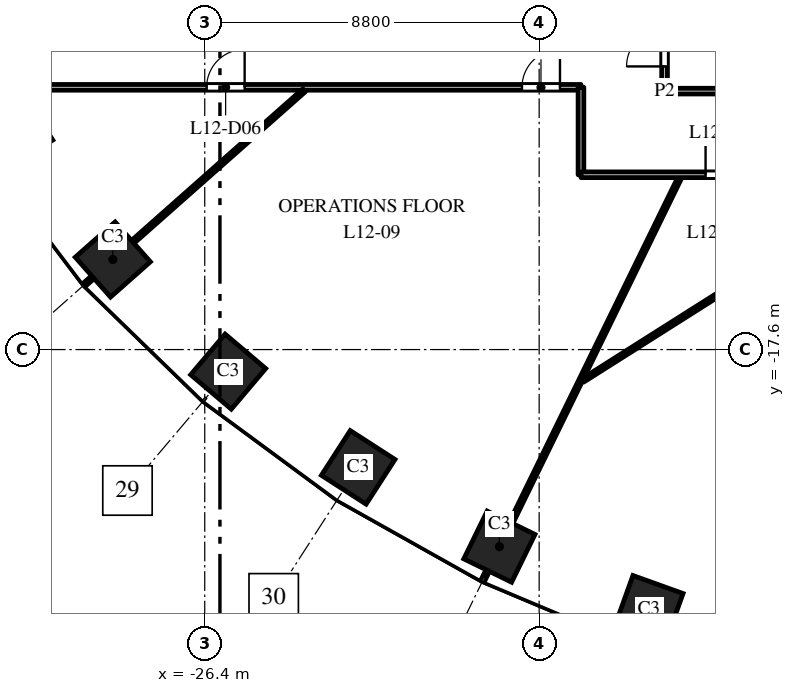
"""IFC4 building model, lengths in metres.
Left out: names, types, materials, properties, quantities, classifications, styles, units other than length and angle.
Written with IfcOpenShell. Run it as: python <this file> out.ifc"""

import sys

from ifc_helpers import new_model, si_unit, direction, frame, frame_2d, origin, origin_2d, place, context, subcontext, project, spatial, rectangle, extrude, element, fill, save


model = new_model("IFC4")
c1 = context("Model", 3, precision=1e-05, world=origin(), true_north=direction((0.0, 1.0)))
c2 = subcontext(c1, "Body", "Model", "MODEL_VIEW")
j1 = project(units=[si_unit("LENGTHUNIT", "METRE"), si_unit("PLANEANGLEUNIT", "RADIAN")], contexts=[c1])
p1 = place(None, origin())
s1 = spatial("IfcSite", under=j1, at=p1, CompositionType="ELEMENT")
p2 = place(p1, origin())
s2 = spatial("IfcBuilding", under=s1, at=p2, CompositionType="ELEMENT")
p3 = place(p2, frame((0.0, 0.0, 58.5)))
s3 = spatial("IfcBuildingStorey", under=s2, at=p3, CompositionType="ELEMENT", Elevation=58.5)
for number, where, z_axis, x_axis in (
    (1, (-31.365, -11.871, 0.0), (0.0, 0.0, 1.0), (0.535, -0.845, 0.0)),
    (2, (-28.819, -15.23, 0.0), (0.0, 0.0, 1.0), (0.663, -0.749, 0.0)),
    (3, (-25.783, -18.18, 0.0), (0.0, 0.0, 1.0), (0.763, -0.646, 0.0)),
    (4, (-22.362, -20.7, 0.0), (0.0, 0.0, 1.0), (0.84, -0.542, 0.0)),
    (5, (-18.646, -22.785, 0.0), (0.0, 0.0, 1.0), (0.898, -0.439, 0.0)),
    (6, (-14.709, -24.441, 0.0), (0.0, 0.0, 1.0), (0.941, -0.338, 0.0)),
):
    element("IfcColumn", number, at=place(p3, frame(where, z_axis=z_axis, x_axis=x_axis)), inside=s3, PredefinedType="COLUMN", context=c2, shape_type="SweptSolid", body=[
        extrude(rectangle(XDim=1.4, YDim=1.4, at=origin_2d()), origin(), (0.0, 0.0, 1.0), 4.0),
    ])
p4 = place(p3, frame((-31.5, -10.7, 0.0), z_axis=(0.0, 0.0, 1.0), x_axis=(1.0, 0.0, 0.0)))
e7 = element("IfcWall", 7, at=p4, inside=s3, PredefinedType="PARTITIONING", context=c2, shape_type="SweptSolid", body=[
    extrude(rectangle(XDim=15.0, YDim=0.15, at=frame_2d((7.5, 0.0))), origin(), (0.0, 0.0, 1.0), 3.1),
])
p5 = place(p4, frame((5.15, 0.0, 0.0)))
e8 = element("IfcOpeningElement", 8, at=p5, cuts=e7, PredefinedType="OPENING", context=c2, shape_type="SweptSolid", body=[
    extrude(rectangle(XDim=1.0, YDim=2.1, at=frame_2d((0.5, 1.05))), frame((0.0, 0.085, 0.0), z_axis=(0.0, -1.0, 0.0), x_axis=(1.0, 0.0, 0.0)), (0.0, 0.0, 1.0), 0.17),
])
p6 = place(p4, frame((13.448, 0.0, 0.0)))
e9 = element("IfcOpeningElement", 9, at=p6, cuts=e7, PredefinedType="OPENING", context=c2, shape_type="SweptSolid", body=[
    extrude(rectangle(XDim=1.0, YDim=2.1, at=frame_2d((0.5, 1.05))), frame((0.0, 0.085, 0.0), z_axis=(0.0, -1.0, 0.0), x_axis=(1.0, 0.0, 0.0)), (0.0, 0.0, 1.0), 0.17),
])
p7 = place(p3, frame((-29.569, -15.895, 0.0), z_axis=(0.0, 0.0, 1.0), x_axis=(0.748985701008, 0.662586160198, 0.0)))
e10 = element("IfcWall", 10, at=p7, inside=s3, PredefinedType="PARTITIONING", context=c2, shape_type="SweptSolid", body=[
    extrude(rectangle(XDim=7.723, YDim=0.1, at=frame_2d((3.861, 0.0))), origin(), (0.0, 0.0, 1.0), 2.85),
])
p8 = place(p3, frame((-19.086, -23.685, 0.0), z_axis=(0.0, 0.0, 1.0), x_axis=(0.439199750603, 0.898389436197, 0.0)))
e11 = element("IfcWall", 11, at=p8, inside=s3, PredefinedType="PARTITIONING", context=c2, shape_type="SweptSolid", body=[
    extrude(rectangle(XDim=11.81, YDim=0.1, at=frame_2d((5.905, 0.0))), origin(), (0.0, 0.0, 1.0), 3.7),
])
p9 = place(p3, frame((-16.452, -18.412, 0.0), z_axis=(0.0, 0.0, 1.0), x_axis=(0.84481391066, 0.535060236194, 0.0)))
e12 = element("IfcWall", 12, at=p9, inside=s3, PredefinedType="PARTITIONING", context=c2, shape_type="SweptSolid", body=[
    extrude(rectangle(XDim=9.971, YDim=0.1, at=frame_2d((4.986, 0.0))), origin(), (0.0, 0.0, 1.0), 2.85),
])
p10 = place(p3, frame((-16.5, -13.0, 0.0), z_axis=(0.0, 0.0, 1.0), x_axis=(0.0, 1.0, 0.0)))
e13 = element("IfcWall", 13, at=p10, inside=s3, PredefinedType="PARTITIONING", context=c2, shape_type="SweptSolid", body=[
    extrude(rectangle(XDim=2.3, YDim=0.15, at=frame_2d((1.15, 0.0))), origin(), (0.0, 0.0, 1.0), 2.75),
])
p11 = place(p3, frame((-16.5, -13.0, 0.0), z_axis=(0.0, 0.0, 1.0), x_axis=(1.0, 0.0, 0.0)))
e14 = element("IfcWall", 14, at=p11, inside=s3, PredefinedType="PARTITIONING", context=c2, shape_type="SweptSolid", body=[
    extrude(rectangle(XDim=15.334, YDim=0.15, at=frame_2d((7.667, 0.0))), origin(), (0.0, 0.0, 1.0), 2.85),
])
p12 = place(p11, frame((13.739, 0.0, 0.0)))
e15 = element("IfcOpeningElement", 15, at=p12, cuts=e14, PredefinedType="OPENING", context=c2, shape_type="SweptSolid", body=[
    extrude(rectangle(XDim=1.0, YDim=2.1, at=frame_2d((0.5, 1.05))), frame((0.0, 0.085, 0.0), z_axis=(0.0, -1.0, 0.0), x_axis=(1.0, 0.0, 0.0)), (0.0, 0.0, 1.0), 0.17),
])
p13 = place(p11, frame((3.279, 0.0, 0.0)))
e16 = element("IfcOpeningElement", 16, at=p13, cuts=e14, PredefinedType="OPENING", context=c2, shape_type="SweptSolid", body=[
    extrude(rectangle(XDim=1.0, YDim=2.1, at=frame_2d((0.5, 1.05))), frame((0.0, 0.085, 0.0), z_axis=(0.0, -1.0, 0.0), x_axis=(1.0, 0.0, 0.0)), (0.0, 0.0, 1.0), 0.17),
])
p14 = place(p3, frame((-14.3, -10.8, 0.0), z_axis=(0.0, 0.0, 1.0), x_axis=(0.0, 1.0, 0.0)))
e17 = element("IfcWall", 17, at=p14, inside=s3, PredefinedType="PARTITIONING", context=c2, shape_type="SweptSolid", body=[
    extrude(rectangle(XDim=21.6, YDim=0.15, at=frame_2d((10.8, 0.0))), origin(), (0.0, 0.0, 1.0), 2.75),
])
p15 = place(p14, frame((0.65, 0.0, 0.0)))
e18 = element("IfcOpeningElement", 18, at=p15, cuts=e17, PredefinedType="OPENING", context=c2, shape_type="SweptSolid", body=[
    extrude(rectangle(XDim=1.0, YDim=2.1, at=frame_2d((0.5, 1.05))), frame((0.0, 0.085, 0.0), z_axis=(0.0, -1.0, 0.0), x_axis=(1.0, 0.0, 0.0)), (0.0, 0.0, 1.0), 0.17),
])
p16 = place(p3, frame((-14.3, -10.8, 0.0), z_axis=(0.0, 0.0, 1.0), x_axis=(1.0, 0.0, 0.0)))
e19 = element("IfcWall", 19, at=p16, inside=s3, PredefinedType="PARTITIONING", context=c2, shape_type="SweptSolid", body=[
    extrude(rectangle(XDim=28.6, YDim=0.15, at=frame_2d((14.3, 0.0))), origin(), (0.0, 0.0, 1.0), 2.85),
])
p17 = place(p16, frame((13.127, 0.0, 0.0)))
e20 = element("IfcOpeningElement", 20, at=p17, cuts=e19, PredefinedType="OPENING", context=c2, shape_type="SweptSolid", body=[
    extrude(rectangle(XDim=1.0, YDim=2.1, at=frame_2d((0.5, 1.05))), frame((0.0, 0.085, 0.0), z_axis=(0.0, -1.0, 0.0), x_axis=(1.0, 0.0, 0.0)), (0.0, 0.0, 1.0), 0.17),
])
p18 = place(p16, frame((17.893, 0.0, 0.0)))
e21 = element("IfcOpeningElement", 21, at=p18, cuts=e19, PredefinedType="OPENING", context=c2, shape_type="SweptSolid", body=[
    extrude(rectangle(XDim=1.0, YDim=2.1, at=frame_2d((0.5, 1.05))), frame((0.0, 0.085, 0.0), z_axis=(0.0, -1.0, 0.0), x_axis=(1.0, 0.0, 0.0)), (0.0, 0.0, 1.0), 0.17),
])
p19 = place(p15, origin())
e22 = element("IfcDoor", 22, at=p19, inside=s3, OperationType="SINGLE_SWING_LEFT", PredefinedType="DOOR", context=c2, shape_type="SweptSolid", body=[
    extrude(rectangle(XDim=1.0, YDim=2.1, at=frame_2d((0.5, 1.05))), frame((0.0, 0.025, 0.0), z_axis=(0.0, -1.0, 0.0), x_axis=(1.0, 0.0, 0.0)), (0.0, 0.0, 1.0), 0.05),
])
fill(e18, e22)
p20 = place(p5, origin())
e23 = element("IfcDoor", 23, at=p20, inside=s3, OperationType="SINGLE_SWING_RIGHT", PredefinedType="DOOR", context=c2, shape_type="SweptSolid", body=[
    extrude(rectangle(XDim=1.0, YDim=2.1, at=frame_2d((0.5, 1.05))), frame((0.0, 0.025, 0.0), z_axis=(0.0, -1.0, 0.0), x_axis=(1.0, 0.0, 0.0)), (0.0, 0.0, 1.0), 0.05),
])
fill(e8, e23)
p21 = place(p6, origin())
e24 = element("IfcDoor", 24, at=p21, inside=s3, OperationType="SINGLE_SWING_RIGHT", PredefinedType="DOOR", context=c2, shape_type="SweptSolid", body=[
    extrude(rectangle(XDim=1.0, YDim=2.1, at=frame_2d((0.5, 1.05))), frame((0.0, 0.025, 0.0), z_axis=(0.0, -1.0, 0.0), x_axis=(1.0, 0.0, 0.0)), (0.0, 0.0, 1.0), 0.05),
])
fill(e9, e24)
p22 = place(p13, origin())
e25 = element("IfcDoor", 25, at=p22, inside=s3, OperationType="SINGLE_SWING_LEFT", PredefinedType="DOOR", context=c2, shape_type="SweptSolid", body=[
    extrude(rectangle(XDim=1.0, YDim=2.1, at=frame_2d((0.5, 1.05))), frame((0.0, 0.025, 0.0), z_axis=(0.0, -1.0, 0.0), x_axis=(1.0, 0.0, 0.0)), (0.0, 0.0, 1.0), 0.05),
])
fill(e16, e25)
save(model, sys.argv[1])
